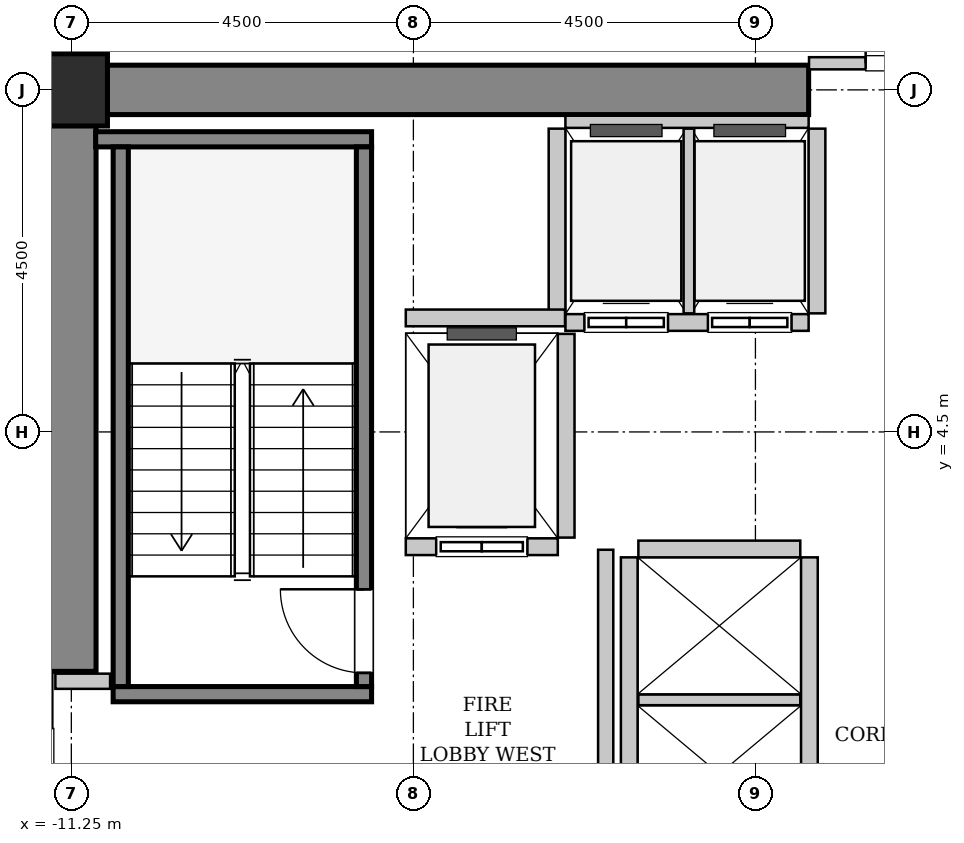
"""IFC4 building model, lengths in metres.
Left out: names, types, materials, properties, quantities, classifications, styles, units other than length and angle.
Written with IfcOpenShell. Run it as: python <this file> out.ifc"""

import sys

from ifc_helpers import new_model, si_unit, direction, frame, frame_2d, origin, origin_2d, place, context, subcontext, project, spatial, rectangle, hollow_rectangle, extrude, source, transform, mapped, element, fill, save


model = new_model("IFC4")
c1 = context("Model", 3, precision=1e-05, world=origin(), true_north=direction((0.0, 1.0)))
c2 = subcontext(c1, "Body", "Model", "MODEL_VIEW")
j1 = project(units=[si_unit("LENGTHUNIT", "METRE"), si_unit("PLANEANGLEUNIT", "RADIAN")], contexts=[c1])
p1 = place(None, origin())
s1 = spatial("IfcSite", under=j1, at=p1, CompositionType="ELEMENT")
p2 = place(p1, origin())
s2 = spatial("IfcBuilding", under=s1, at=p2, CompositionType="ELEMENT")
p3 = place(p2, frame((0.0, 0.0, 71.0)))
s3 = spatial("IfcBuildingStorey", under=s2, at=p3, CompositionType="ELEMENT", Elevation=71.0)
m1 = source(origin(), c2, "Body", "SweptSolid", [
    extrude(rectangle(XDim=10.025, YDim=0.65, at=frame_2d((5.012, 0.0))), origin(), (0.0, 0.0, 1.0), 3.8),
])
p4 = place(p3, frame((-11.575, 9.0, 0.0), z_axis=(0.0, 0.0, 1.0), x_axis=(1.0, 0.0, 0.0)))
e1 = element("IfcWall", 1, at=p4, inside=s3, PredefinedType="SHEAR", context=c2, shape_type="MappedRepresentation", body=[
    mapped(m1, transform((0.0, 0.0, 0.0), x_axis=(1.0, 0.0, 0.0), y_axis=(0.0, 1.0, 0.0), z_axis=(0.0, 0.0, 1.0), scale=1.0)),
])
m2 = source(origin(), c2, "Body", "SweptSolid", [
    extrude(rectangle(XDim=7.325, YDim=0.65, at=frame_2d((3.663, 0.0))), origin(), (0.0, 0.0, 1.0), 3.8),
])
p5 = place(p3, frame((-11.25, 1.35, 0.0), z_axis=(0.0, 0.0, 1.0), x_axis=(0.0, 1.0, 0.0)))
e2 = element("IfcWall", 2, at=p5, inside=s3, PredefinedType="SHEAR", context=c2, shape_type="MappedRepresentation", body=[
    mapped(m2, transform((0.0, 0.0, 0.0), x_axis=(1.0, 0.0, 0.0), y_axis=(0.0, 1.0, 0.0), z_axis=(0.0, 0.0, 1.0), scale=1.0)),
])
m3 = source(origin(), c2, "Body", "SweptSolid", [
    extrude(hollow_rectangle(XDim=0.95, YDim=0.95, WallThickness=0.045, InnerFilletRadius=0.045, OuterFilletRadius=0.09, at=origin_2d()), origin(), (0.0, 0.0, 1.0), 3.8),
])
p6 = place(p3, frame((-11.25, 9.0, 0.0), z_axis=(0.0, 0.0, 1.0), x_axis=(1.0, 0.0, 0.0)))
e3 = element("IfcColumn", 3, at=p6, inside=s3, PredefinedType="COLUMN", context=c2, shape_type="MappedRepresentation", body=[
    mapped(m3, transform((0.0, 0.0, 0.0), x_axis=(1.0, 0.0, 0.0), y_axis=(0.0, 1.0, 0.0), z_axis=(0.0, 0.0, 1.0), scale=1.0)),
])
m4 = source(origin(), c2, "Body", "SweptSolid", [
    extrude(rectangle(XDim=3.4, YDim=0.2, at=frame_2d((1.7, 0.0))), origin(), (0.0, 0.0, 1.0), 3.8),
])
p7 = place(p3, frame((-7.3, 1.05, 0.0), z_axis=(0.0, 0.0, 1.0), x_axis=(-1.0, 0.0, 0.0)))
e4 = element("IfcWall", 4, at=p7, inside=s3, PredefinedType="SOLIDWALL", context=c2, shape_type="MappedRepresentation", body=[
    mapped(m4, transform((0.0, 0.0, 0.0), x_axis=(1.0, 0.0, 0.0), y_axis=(0.0, 1.0, 0.0), z_axis=(0.0, 0.0, 1.0), scale=1.0)),
])
m5 = source(origin(), c2, "Body", "SweptSolid", [
    extrude(rectangle(XDim=3.63, YDim=0.2, at=frame_2d((1.815, 0.0))), origin(), (0.0, 0.0, 1.0), 3.8),
])
p8 = place(p3, frame((-7.3, 8.35, 0.0), z_axis=(0.0, 0.0, 1.0), x_axis=(-1.0, 0.0, 0.0)))
e5 = element("IfcWall", 5, at=p8, inside=s3, PredefinedType="SOLIDWALL", context=c2, shape_type="MappedRepresentation", body=[
    mapped(m5, transform((0.0, 0.0, 0.0), x_axis=(1.0, 0.0, 0.0), y_axis=(0.0, 1.0, 0.0), z_axis=(0.0, 0.0, 1.0), scale=1.0)),
])
m6 = source(origin(), c2, "Body", "SweptSolid", [
    extrude(rectangle(XDim=7.1, YDim=0.2, at=frame_2d((3.55, 0.0))), origin(), (0.0, 0.0, 1.0), 3.8),
])
p9 = place(p3, frame((-7.4, 1.15, 0.0), z_axis=(0.0, 0.0, 1.0), x_axis=(0.0, 1.0, 0.0)))
e6 = element("IfcWall", 6, at=p9, inside=s3, PredefinedType="SOLIDWALL", context=c2, shape_type="MappedRepresentation", body=[
    mapped(m6, transform((0.0, 0.0, 0.0), x_axis=(1.0, 0.0, 0.0), y_axis=(0.0, 1.0, 0.0), z_axis=(0.0, 0.0, 1.0), scale=1.0)),
])
p10 = place(p9, frame((0.18, 0.0, 0.0)))
e7 = element("IfcOpeningElement", 7, at=p10, cuts=e6, PredefinedType="OPENING", context=c2, shape_type="SweptSolid", body=[
    extrude(rectangle(XDim=1.1, YDim=2.15, at=frame_2d((0.55, 1.075))), frame((0.0, 0.11, 0.0), z_axis=(0.0, -1.0, 0.0), x_axis=(1.0, 0.0, 0.0)), (0.0, 0.0, 1.0), 0.22),
])
p11 = place(p3, frame((-10.6, 1.15, 0.0), z_axis=(0.0, 0.0, 1.0), x_axis=(0.0, 1.0, 0.0)))
e8 = element("IfcWall", 8, at=p11, inside=s3, PredefinedType="SOLIDWALL", context=c2, shape_type="MappedRepresentation", body=[
    mapped(m6, transform((0.0, 0.0, 0.0), x_axis=(1.0, 0.0, 0.0), y_axis=(0.0, 1.0, 0.0), z_axis=(0.0, 0.0, 1.0), scale=1.0)),
])
m7 = source(origin(), c2, "Body", "SweptSolid", [
    extrude(rectangle(XDim=2.0, YDim=0.22, at=frame_2d((1.0, 0.0))), origin(), (0.0, 0.0, 1.0), 3.535),
])
p12 = place(p3, frame((-6.85, 2.99, 0.0), z_axis=(0.0, 0.0, 1.0), x_axis=(1.0, 0.0, 0.0)))
e9 = element("IfcWall", 9, at=p12, inside=s3, PredefinedType="SOLIDWALL", context=c2, shape_type="MappedRepresentation", body=[
    mapped(m7, transform((0.0, 0.0, 0.0), x_axis=(1.0, 0.0, 0.0), y_axis=(0.0, 1.0, 0.0), z_axis=(0.0, 0.0, 1.0), scale=1.0)),
])
p13 = place(p12, frame((0.4, 0.0, 0.0)))
e10 = element("IfcOpeningElement", 10, at=p13, cuts=e9, PredefinedType="OPENING", context=c2, shape_type="SweptSolid", body=[
    extrude(rectangle(XDim=1.2, YDim=2.2, at=frame_2d((0.6, 1.1))), frame((0.0, 0.12, 0.0), z_axis=(0.0, -1.0, 0.0), x_axis=(1.0, 0.0, 0.0)), (0.0, 0.0, 1.0), 0.24),
])
m8 = source(origin(), c2, "Body", "SweptSolid", [
    extrude(rectangle(XDim=2.68, YDim=0.22, at=frame_2d((1.34, 0.0))), origin(), (0.0, 0.0, 1.0), 3.535),
])
p14 = place(p3, frame((-4.74, 3.11, 0.0), z_axis=(0.0, 0.0, 1.0), x_axis=(0.0, 1.0, 0.0)))
e11 = element("IfcWall", 11, at=p14, inside=s3, PredefinedType="SOLIDWALL", context=c2, shape_type="MappedRepresentation", body=[
    mapped(m8, transform((0.0, 0.0, 0.0), x_axis=(1.0, 0.0, 0.0), y_axis=(0.0, 1.0, 0.0), z_axis=(0.0, 0.0, 1.0), scale=1.0)),
])
m9 = source(origin(), c2, "Body", "SweptSolid", [
    extrude(rectangle(XDim=3.2, YDim=0.22, at=frame_2d((1.6, 0.0))), origin(), (0.0, 0.0, 1.0), 3.535),
])
p15 = place(p3, frame((-4.75, 5.94, 0.0), z_axis=(0.0, 0.0, 1.0), x_axis=(1.0, 0.0, 0.0)))
e12 = element("IfcWall", 12, at=p15, inside=s3, PredefinedType="SOLIDWALL", context=c2, shape_type="MappedRepresentation", body=[
    mapped(m9, transform((0.0, 0.0, 0.0), x_axis=(1.0, 0.0, 0.0), y_axis=(0.0, 1.0, 0.0), z_axis=(0.0, 0.0, 1.0), scale=1.0)),
])
p16 = place(p15, frame((0.25, 0.0, 0.0)))
e13 = element("IfcOpeningElement", 13, at=p16, cuts=e12, PredefinedType="OPENING", context=c2, shape_type="SweptSolid", body=[
    extrude(rectangle(XDim=1.1, YDim=2.2, at=frame_2d((0.55, 1.1))), frame((0.0, 0.12, 0.0), z_axis=(0.0, -1.0, 0.0), x_axis=(1.0, 0.0, 0.0)), (0.0, 0.0, 1.0), 0.24),
])
p17 = place(p15, frame((1.875, 0.0, 0.0)))
e14 = element("IfcOpeningElement", 14, at=p17, cuts=e12, PredefinedType="OPENING", context=c2, shape_type="SweptSolid", body=[
    extrude(rectangle(XDim=1.1, YDim=2.2, at=frame_2d((0.55, 1.1))), frame((0.0, 0.12, 0.0), z_axis=(0.0, -1.0, 0.0), x_axis=(1.0, 0.0, 0.0)), (0.0, 0.0, 1.0), 0.24),
])
m10 = source(origin(), c2, "Body", "SweptSolid", [
    extrude(rectangle(XDim=3.2, YDim=0.16, at=frame_2d((1.6, 0.0))), origin(), (0.0, 0.0, 1.0), 2.425),
])
p18 = place(p3, frame((-1.55, 8.58, 0.0), z_axis=(0.0, 0.0, 1.0), x_axis=(-1.0, 0.0, 0.0)))
e15 = element("IfcWall", 15, at=p18, inside=s3, PredefinedType="PARTITIONING", context=c2, shape_type="MappedRepresentation", body=[
    mapped(m10, transform((0.0, 0.0, 0.0), x_axis=(1.0, 0.0, 0.0), y_axis=(0.0, 1.0, 0.0), z_axis=(0.0, 0.0, 1.0), scale=1.0)),
])
m11 = source(origin(), c2, "Body", "SweptSolid", [
    extrude(rectangle(XDim=2.43, YDim=0.22, at=frame_2d((1.215, 0.0))), origin(), (0.0, 0.0, 1.0), 3.535),
])
p19 = place(p3, frame((-4.86, 8.49, 0.0), z_axis=(0.0, 0.0, 1.0), x_axis=(0.0, -1.0, 0.0)))
e16 = element("IfcWall", 16, at=p19, inside=s3, PredefinedType="SOLIDWALL", context=c2, shape_type="MappedRepresentation", body=[
    mapped(m11, transform((0.0, 0.0, 0.0), x_axis=(1.0, 0.0, 0.0), y_axis=(0.0, 1.0, 0.0), z_axis=(0.0, 0.0, 1.0), scale=1.0)),
])
m12 = source(origin(), c2, "Body", "SweptSolid", [
    extrude(rectangle(XDim=2.43, YDim=0.14, at=frame_2d((1.215, 0.0))), origin(), (0.0, 0.0, 1.0), 3.535),
])
p20 = place(p3, frame((-3.125, 6.06, 0.0), z_axis=(0.0, 0.0, 1.0), x_axis=(0.0, 1.0, 0.0)))
e17 = element("IfcWall", 17, at=p20, inside=s3, PredefinedType="PARTITIONING", context=c2, shape_type="MappedRepresentation", body=[
    mapped(m12, transform((0.0, 0.0, 0.0), x_axis=(1.0, 0.0, 0.0), y_axis=(0.0, 1.0, 0.0), z_axis=(0.0, 0.0, 1.0), scale=1.0)),
])
p21 = place(p3, frame((-1.44, 6.06, 0.0), z_axis=(0.0, 0.0, 1.0), x_axis=(0.0, 1.0, 0.0)))
e18 = element("IfcWall", 18, at=p21, inside=s3, PredefinedType="SOLIDWALL", context=c2, shape_type="MappedRepresentation", body=[
    mapped(m11, transform((0.0, 0.0, 0.0), x_axis=(1.0, 0.0, 0.0), y_axis=(0.0, 1.0, 0.0), z_axis=(0.0, 0.0, 1.0), scale=1.0)),
])
m13 = source(origin(), c2, "Body", "SweptSolid", [
    extrude(rectangle(XDim=5.7, YDim=0.22, at=frame_2d((2.85, 0.0))), origin(), (0.0, 0.0, 1.0), 3.535),
])
for number, where, z_axis, x_axis in (
    (19, (-1.54, -2.85, 0.0), (0.0, 0.0, 1.0), (0.0, 1.0, 0.0)),
    (20, (-3.91, 2.85, 0.0), (0.0, 0.0, 1.0), (0.0, -1.0, 0.0)),
):
    element("IfcWall", number, at=place(p3, frame(where, z_axis=z_axis, x_axis=x_axis)), inside=s3, PredefinedType="SOLIDWALL", context=c2, shape_type="MappedRepresentation", body=[
        mapped(m13, transform((0.0, 0.0, 0.0), x_axis=(1.0, 0.0, 0.0), y_axis=(0.0, 1.0, 0.0), z_axis=(0.0, 0.0, 1.0), scale=1.0)),
    ])
m14 = source(origin(), c2, "Body", "SweptSolid", [
    extrude(rectangle(XDim=2.13, YDim=0.14, at=frame_2d((1.065, 0.0))), origin(), (0.0, 0.0, 1.0), 3.535),
])
p22 = place(p3, frame((-3.79, 0.975, 0.0), z_axis=(0.0, 0.0, 1.0), x_axis=(1.0, 0.0, 0.0)))
e21 = element("IfcWall", 21, at=p22, inside=s3, PredefinedType="PARTITIONING", context=c2, shape_type="MappedRepresentation", body=[
    mapped(m14, transform((0.0, 0.0, 0.0), x_axis=(1.0, 0.0, 0.0), y_axis=(0.0, 1.0, 0.0), z_axis=(0.0, 0.0, 1.0), scale=1.0)),
])
m15 = source(origin(), c2, "Body", "SweptSolid", [
    extrude(rectangle(XDim=2.13, YDim=0.22, at=frame_2d((1.065, 0.0))), origin(), (0.0, 0.0, 1.0), 3.535),
])
p23 = place(p3, frame((-1.66, 2.96, 0.0), z_axis=(0.0, 0.0, 1.0), x_axis=(-1.0, 0.0, 0.0)))
e22 = element("IfcWall", 22, at=p23, inside=s3, PredefinedType="SOLIDWALL", context=c2, shape_type="MappedRepresentation", body=[
    mapped(m15, transform((0.0, 0.0, 0.0), x_axis=(1.0, 0.0, 0.0), y_axis=(0.0, 1.0, 0.0), z_axis=(0.0, 0.0, 1.0), scale=1.0)),
])
m16 = source(origin(), c2, "Body", "SweptSolid", [
    extrude(rectangle(XDim=2.095, YDim=0.22, at=frame_2d((1.048, 0.0))), origin(), (0.0, 0.0, 1.0), 3.535),
])
p24 = place(p3, frame((-6.85, 6.0, 0.0), z_axis=(0.0, 0.0, 1.0), x_axis=(1.0, 0.0, 0.0)))
e23 = element("IfcWall", 23, at=p24, inside=s3, PredefinedType="SOLIDWALL", context=c2, shape_type="MappedRepresentation", body=[
    mapped(m16, transform((0.0, 0.0, 0.0), x_axis=(1.0, 0.0, 0.0), y_axis=(0.0, 1.0, 0.0), z_axis=(0.0, 0.0, 1.0), scale=1.0)),
])
m17 = source(origin(), c2, "Body", "SweptSolid", [
    extrude(rectangle(XDim=5.9, YDim=0.2, at=frame_2d((2.95, 0.0))), origin(), (0.0, 0.0, 1.0), 3.535),
])
p25 = place(p3, frame((-4.22, -2.95, 0.0), z_axis=(0.0, 0.0, 1.0), x_axis=(0.0, 1.0, 0.0)))
e24 = element("IfcWall", 24, at=p25, inside=s3, PredefinedType="PARTITIONING", context=c2, shape_type="MappedRepresentation", body=[
    mapped(m17, transform((0.0, 0.0, 0.0), x_axis=(1.0, 0.0, 0.0), y_axis=(0.0, 1.0, 0.0), z_axis=(0.0, 0.0, 1.0), scale=1.0)),
])
m18 = source(origin(), c2, "Body", "SweptSolid", [
    extrude(rectangle(XDim=0.72, YDim=0.2, at=frame_2d((0.36, 0.0))), origin(), (0.0, 0.0, 1.0), 3.535),
])
p26 = place(p3, frame((-11.46, 1.22, 0.0), z_axis=(0.0, 0.0, 1.0), x_axis=(1.0, 0.0, 0.0)))
e25 = element("IfcWall", 25, at=p26, inside=s3, PredefinedType="PARTITIONING", context=c2, shape_type="MappedRepresentation", body=[
    mapped(m18, transform((0.0, 0.0, 0.0), x_axis=(1.0, 0.0, 0.0), y_axis=(0.0, 1.0, 0.0), z_axis=(0.0, 0.0, 1.0), scale=1.0)),
])
m19 = source(origin(), c2, "Body", "SweptSolid", [
    extrude(rectangle(XDim=3.09, YDim=0.16, at=frame_2d((1.545, 0.0))), origin(), (0.0, 0.0, 1.0), 2.425),
])
p27 = place(p3, frame((-1.545, 9.35, 0.0), z_axis=(0.0, 0.0, 1.0), x_axis=(1.0, 0.0, 0.0)))
e26 = element("IfcWall", 26, at=p27, inside=s3, PredefinedType="PARTITIONING", context=c2, shape_type="MappedRepresentation", body=[
    mapped(m19, transform((0.0, 0.0, 0.0), x_axis=(1.0, 0.0, 0.0), y_axis=(0.0, 1.0, 0.0), z_axis=(0.0, 0.0, 1.0), scale=1.0)),
])
p28 = place(p27, frame((0.745, 0.0, 0.0)))
e27 = element("IfcOpeningElement", 27, at=p28, cuts=e26, PredefinedType="OPENING", context=c2, shape_type="SweptSolid", body=[
    extrude(rectangle(XDim=1.6, YDim=2.3, at=frame_2d((0.8, 1.15))), frame((0.0, 0.09, 0.0), z_axis=(0.0, -1.0, 0.0), x_axis=(1.0, 0.0, 0.0)), (0.0, 0.0, 1.0), 0.18),
])
m20 = source(origin(), c2, "Body", "SweptSolid", [
    extrude(rectangle(XDim=1.1, YDim=2.15, at=frame_2d((0.55, 1.075))), frame((0.0, 0.025, 0.0), z_axis=(0.0, -1.0, 0.0), x_axis=(1.0, 0.0, 0.0)), (0.0, 0.0, 1.0), 0.05),
])
p29 = place(p10, origin())
e28 = element("IfcDoor", 28, at=p29, inside=s3, OperationType="SINGLE_SWING_RIGHT", PredefinedType="DOOR", context=c2, shape_type="MappedRepresentation", body=[
    mapped(m20, transform((0.0, 0.0, 0.0), x_axis=(1.0, 0.0, 0.0), y_axis=(0.0, 1.0, 0.0), z_axis=(0.0, 0.0, 1.0), scale=1.0)),
])
fill(e7, e28)
m21 = source(origin(), c2, "Body", "SweptSolid", [
    extrude(rectangle(XDim=1.2, YDim=2.2, at=frame_2d((0.6, 1.1))), frame((0.0, 0.025, 0.0), z_axis=(0.0, -1.0, 0.0), x_axis=(1.0, 0.0, 0.0)), (0.0, 0.0, 1.0), 0.05),
])
p30 = place(p13, origin())
e29 = element("IfcDoor", 29, at=p30, inside=s3, OperationType="SLIDING_TO_LEFT", PredefinedType="DOOR", context=c2, shape_type="MappedRepresentation", body=[
    mapped(m21, transform((0.0, 0.0, 0.0), x_axis=(1.0, 0.0, 0.0), y_axis=(0.0, 1.0, 0.0), z_axis=(0.0, 0.0, 1.0), scale=1.0)),
])
fill(e10, e29)
m22 = source(origin(), c2, "Body", "SweptSolid", [
    extrude(rectangle(XDim=1.1, YDim=2.2, at=frame_2d((0.55, 1.1))), frame((0.0, 0.025, 0.0), z_axis=(0.0, -1.0, 0.0), x_axis=(1.0, 0.0, 0.0)), (0.0, 0.0, 1.0), 0.05),
])
p31 = place(p16, origin())
e30 = element("IfcDoor", 30, at=p31, inside=s3, OperationType="DOUBLE_DOOR_SLIDING", PredefinedType="DOOR", context=c2, shape_type="MappedRepresentation", body=[
    mapped(m22, transform((0.0, 0.0, 0.0), x_axis=(1.0, 0.0, 0.0), y_axis=(0.0, 1.0, 0.0), z_axis=(0.0, 0.0, 1.0), scale=1.0)),
])
fill(e13, e30)
p32 = place(p17, origin())
e31 = element("IfcDoor", 31, at=p32, inside=s3, OperationType="DOUBLE_DOOR_SLIDING", PredefinedType="DOOR", context=c2, shape_type="MappedRepresentation", body=[
    mapped(m22, transform((0.0, 0.0, 0.0), x_axis=(1.0, 0.0, 0.0), y_axis=(0.0, 1.0, 0.0), z_axis=(0.0, 0.0, 1.0), scale=1.0)),
])
fill(e14, e31)
m23 = source(origin(), c2, "Body", "SweptSolid", [
    extrude(rectangle(XDim=1.6, YDim=2.3, at=frame_2d((0.8, 1.15))), frame((0.0, 0.025, 0.0), z_axis=(0.0, -1.0, 0.0), x_axis=(1.0, 0.0, 0.0)), (0.0, 0.0, 1.0), 0.05),
])
p33 = place(p28, origin())
e32 = element("IfcDoor", 32, at=p33, inside=s3, OperationType="DOUBLE_DOOR_SINGLE_SWING", PredefinedType="DOOR", context=c2, shape_type="MappedRepresentation", body=[
    mapped(m23, transform((0.0, 0.0, 0.0), x_axis=(1.0, 0.0, 0.0), y_axis=(0.0, 1.0, 0.0), z_axis=(0.0, 0.0, 1.0), scale=1.0)),
])
fill(e27, e32)
save(model, sys.argv[1])
